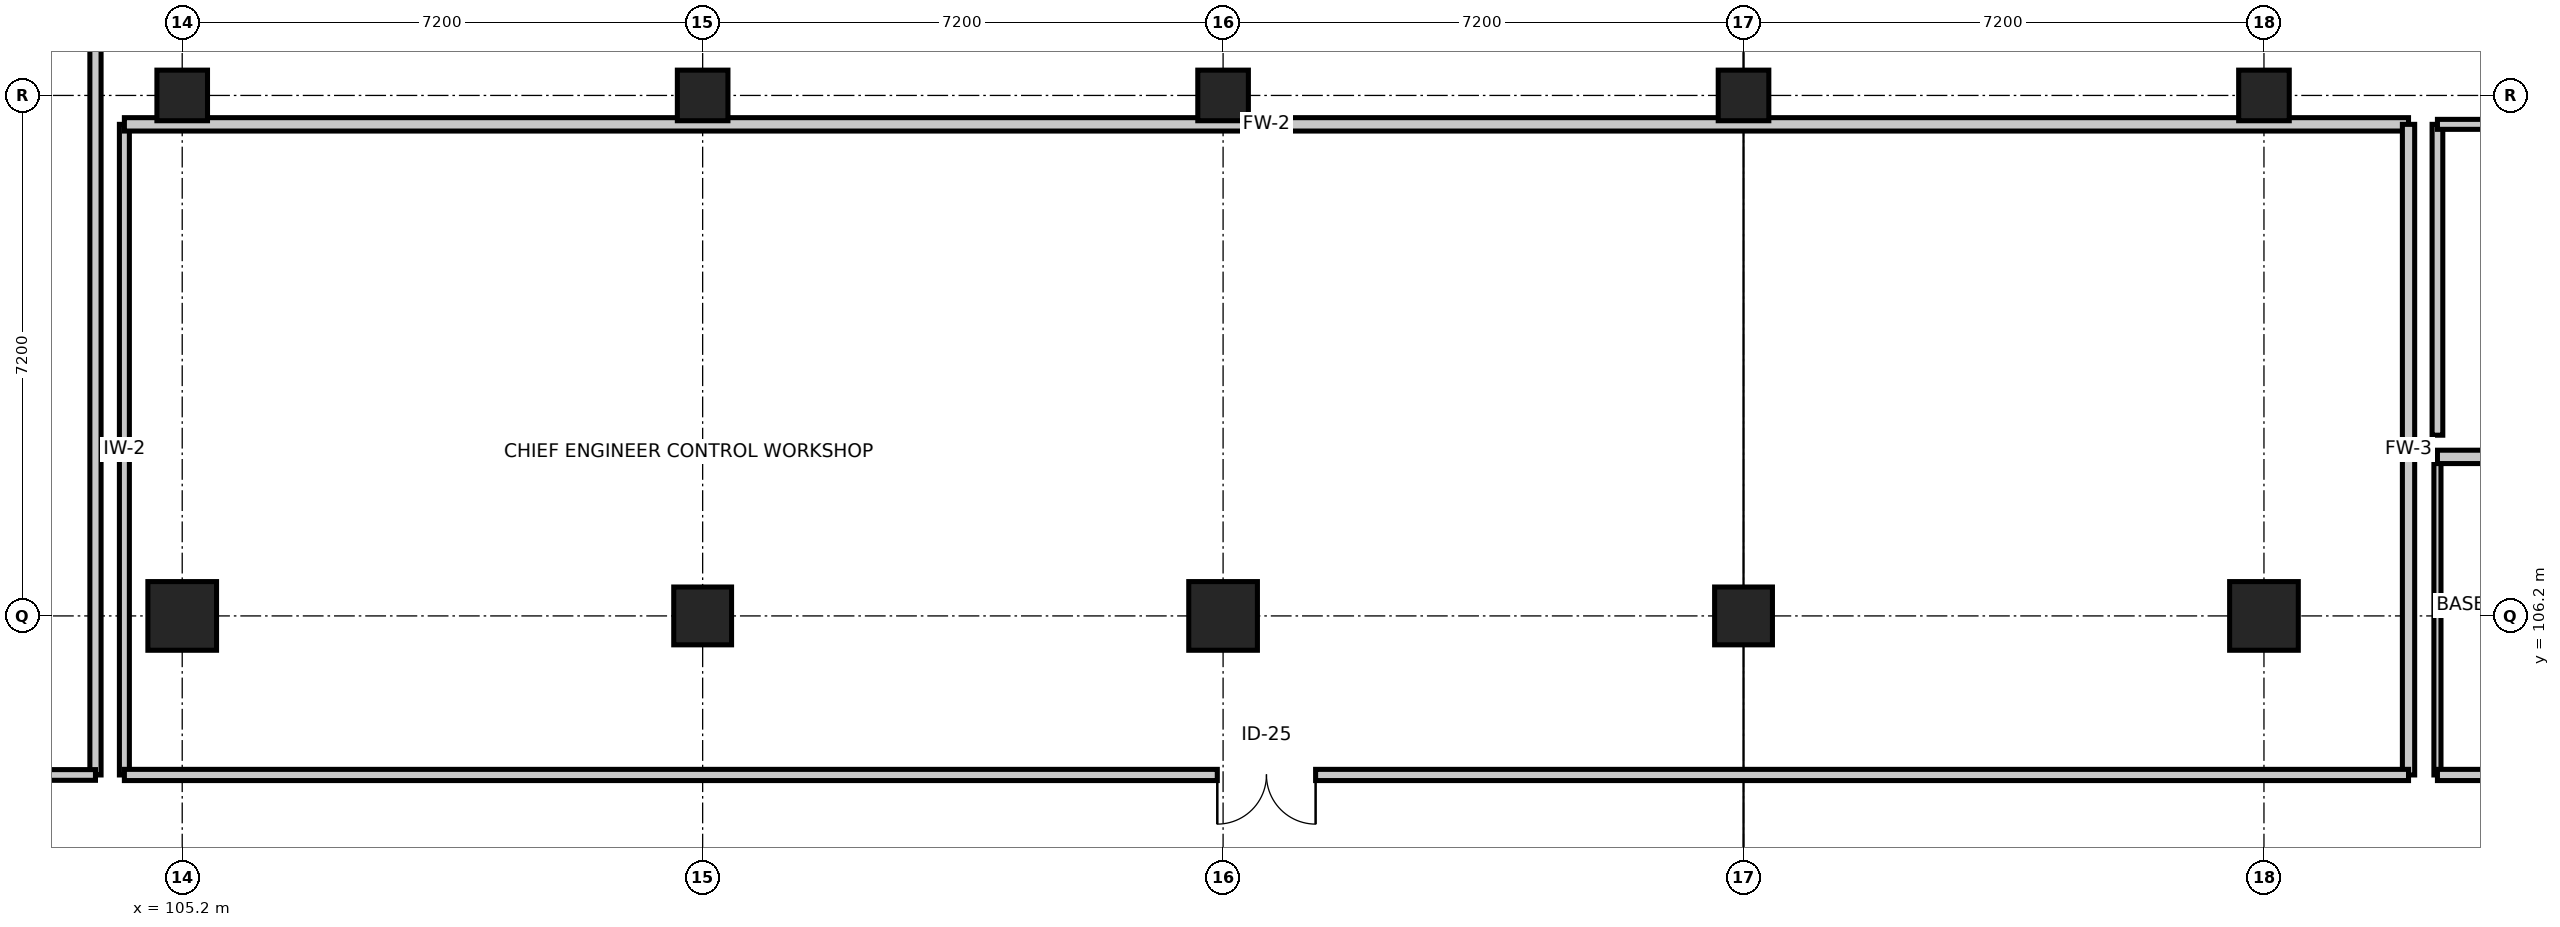
"""IFC4 building model, lengths in metres.
Left out: names, types, materials, properties, quantities, classifications, styles, units other than length and angle.
Written with IfcOpenShell. Run it as: python <this file> out.ifc"""

import sys

from ifc_helpers import new_model, si_unit, direction, frame, frame_2d, origin, origin_2d, place, context, subcontext, project, spatial, rectangle, extrude, element, fill, save


model = new_model("IFC4")
c1 = context("Model", 3, precision=1e-05, world=origin(), true_north=direction((0.0, 1.0)))
c2 = subcontext(c1, "Body", "Model", "MODEL_VIEW")
j1 = project(units=[si_unit("LENGTHUNIT", "METRE"), si_unit("PLANEANGLEUNIT", "RADIAN")], contexts=[c1])
p1 = place(None, origin())
s1 = spatial("IfcSite", under=j1, at=p1, CompositionType="ELEMENT")
p2 = place(p1, origin())
s2 = spatial("IfcBuilding", under=s1, at=p2, CompositionType="ELEMENT")
p3 = place(p2, frame((0.0, 0.0, -4.5)))
s3 = spatial("IfcBuildingStorey", under=s2, at=p3, CompositionType="ELEMENT", Elevation=-4.5)
p4 = place(p3, frame((105.2, 106.2, 0.0), z_axis=(0.0, 0.0, 1.0), x_axis=(1.0, 0.0, 0.0)))
e1 = element("IfcColumn", 1, at=p4, inside=s3, PredefinedType="COLUMN", context=c2, shape_type="SweptSolid", body=[
    extrude(rectangle(XDim=0.95, YDim=0.95, at=origin_2d()), origin(), (0.0, 0.0, 1.0), 4.5),
])
p5 = place(p3, frame((105.2, 113.4, 0.0), z_axis=(0.0, 0.0, 1.0), x_axis=(1.0, 0.0, 0.0)))
e2 = element("IfcColumn", 2, at=p5, inside=s3, PredefinedType="COLUMN", context=c2, shape_type="SweptSolid", body=[
    extrude(rectangle(XDim=0.7, YDim=0.7, at=origin_2d()), origin(), (0.0, 0.0, 1.0), 4.5),
])
p6 = place(p3, frame((112.4, 106.2, 0.0), z_axis=(0.0, 0.0, 1.0), x_axis=(1.0, 0.0, 0.0)))
e3 = element("IfcColumn", 3, at=p6, inside=s3, PredefinedType="COLUMN", context=c2, shape_type="SweptSolid", body=[
    extrude(rectangle(XDim=0.8, YDim=0.8, at=origin_2d()), origin(), (0.0, 0.0, 1.0), 4.5),
])
p7 = place(p3, frame((112.4, 113.4, 0.0), z_axis=(0.0, 0.0, 1.0), x_axis=(1.0, 0.0, 0.0)))
e4 = element("IfcColumn", 4, at=p7, inside=s3, PredefinedType="COLUMN", context=c2, shape_type="SweptSolid", body=[
    extrude(rectangle(XDim=0.7, YDim=0.7, at=origin_2d()), origin(), (0.0, 0.0, 1.0), 4.5),
])
p8 = place(p3, frame((119.6, 106.2, 0.0), z_axis=(0.0, 0.0, 1.0), x_axis=(1.0, 0.0, 0.0)))
e5 = element("IfcColumn", 5, at=p8, inside=s3, PredefinedType="COLUMN", context=c2, shape_type="SweptSolid", body=[
    extrude(rectangle(XDim=0.95, YDim=0.95, at=origin_2d()), origin(), (0.0, 0.0, 1.0), 4.5),
])
p9 = place(p3, frame((119.6, 113.4, 0.0), z_axis=(0.0, 0.0, 1.0), x_axis=(1.0, 0.0, 0.0)))
e6 = element("IfcColumn", 6, at=p9, inside=s3, PredefinedType="COLUMN", context=c2, shape_type="SweptSolid", body=[
    extrude(rectangle(XDim=0.7, YDim=0.7, at=origin_2d()), origin(), (0.0, 0.0, 1.0), 4.5),
])
p10 = place(p3, frame((126.8, 106.2, 0.0), z_axis=(0.0, 0.0, 1.0), x_axis=(1.0, 0.0, 0.0)))
e7 = element("IfcColumn", 7, at=p10, inside=s3, PredefinedType="COLUMN", context=c2, shape_type="SweptSolid", body=[
    extrude(rectangle(XDim=0.8, YDim=0.8, at=origin_2d()), origin(), (0.0, 0.0, 1.0), 4.5),
])
p11 = place(p3, frame((126.8, 113.4, 0.0), z_axis=(0.0, 0.0, 1.0), x_axis=(1.0, 0.0, 0.0)))
e8 = element("IfcColumn", 8, at=p11, inside=s3, PredefinedType="COLUMN", context=c2, shape_type="SweptSolid", body=[
    extrude(rectangle(XDim=0.7, YDim=0.7, at=origin_2d()), origin(), (0.0, 0.0, 1.0), 4.5),
])
p12 = place(p3, frame((134.0, 106.2, 0.0), z_axis=(0.0, 0.0, 1.0), x_axis=(1.0, 0.0, 0.0)))
e9 = element("IfcColumn", 9, at=p12, inside=s3, PredefinedType="COLUMN", context=c2, shape_type="SweptSolid", body=[
    extrude(rectangle(XDim=0.95, YDim=0.95, at=origin_2d()), origin(), (0.0, 0.0, 1.0), 4.5),
])
p13 = place(p3, frame((134.0, 113.4, 0.0), z_axis=(0.0, 0.0, 1.0), x_axis=(1.0, 0.0, 0.0)))
e10 = element("IfcColumn", 10, at=p13, inside=s3, PredefinedType="COLUMN", context=c2, shape_type="SweptSolid", body=[
    extrude(rectangle(XDim=0.7, YDim=0.7, at=origin_2d()), origin(), (0.0, 0.0, 1.0), 4.5),
])
p14 = place(p3, frame((104.0, 117.0, 0.0), z_axis=(0.0, 0.0, 1.0), x_axis=(0.0, -1.0, 0.0)))
e11 = element("IfcWall", 11, at=p14, inside=s3, PredefinedType="PARTITIONING", context=c2, shape_type="SweptSolid", body=[
    extrude(rectangle(XDim=13.0, YDim=0.155, at=frame_2d((6.5, 0.0))), origin(), (0.0, 0.0, 1.0), 3.435),
])
p15 = place(p3, frame((104.0, 104.0, 0.0), z_axis=(0.0, 0.0, 1.0), x_axis=(-1.0, 0.0, 0.0)))
e12 = element("IfcWall", 12, at=p15, inside=s3, PredefinedType="PARTITIONING", context=c2, shape_type="SweptSolid", body=[
    extrude(rectangle(XDim=35.8, YDim=0.148, at=frame_2d((17.9, 0.0))), origin(), (0.0, 0.0, 1.0), 3.335),
])
p16 = place(p15, frame((17.29, 0.0, 0.0)))
e13 = element("IfcOpeningElement", 13, at=p16, cuts=e12, PredefinedType="OPENING", context=c2, shape_type="SweptSolid", body=[
    extrude(rectangle(XDim=1.22, YDim=2.24, at=frame_2d((0.61, 1.12))), frame((0.0, 0.084, 0.0), z_axis=(0.0, -1.0, 0.0), x_axis=(1.0, 0.0, 0.0)), (0.0, 0.0, 1.0), 0.168),
])
p17 = place(p3, frame((104.4, 104.0, 0.0), z_axis=(0.0, 0.0, 1.0), x_axis=(0.0, 1.0, 0.0)))
e14 = element("IfcWall", 14, at=p17, inside=s3, PredefinedType="PARTITIONING", context=c2, shape_type="SweptSolid", body=[
    extrude(rectangle(XDim=9.0, YDim=0.138, at=frame_2d((4.5, 0.0))), origin(), (0.0, 0.0, 1.0), 3.435),
])
p18 = place(p3, frame((104.4, 113.0, 0.0), z_axis=(0.0, 0.0, 1.0), x_axis=(1.0, 0.0, 0.0)))
e15 = element("IfcWall", 15, at=p18, inside=s3, PredefinedType="PARTITIONING", context=c2, shape_type="SweptSolid", body=[
    extrude(rectangle(XDim=31.6, YDim=0.185, at=frame_2d((15.8, 0.0))), origin(), (0.0, 0.0, 1.0), 3.335),
])
p19 = place(p3, frame((136.0, 113.0, 0.0), z_axis=(0.0, 0.0, 1.0), x_axis=(0.0, -1.0, 0.0)))
e16 = element("IfcWall", 16, at=p19, inside=s3, PredefinedType="PARTITIONING", context=c2, shape_type="SweptSolid", body=[
    extrude(rectangle(XDim=9.0, YDim=0.17, at=frame_2d((4.5, 0.0))), origin(), (0.0, 0.0, 1.0), 3.435),
])
p20 = place(p3, frame((136.0, 104.0, 0.0), z_axis=(0.0, 0.0, 1.0), x_axis=(-1.0, 0.0, 0.0)))
e17 = element("IfcWall", 17, at=p20, inside=s3, PredefinedType="PARTITIONING", context=c2, shape_type="SweptSolid", body=[
    extrude(rectangle(XDim=31.6, YDim=0.155, at=frame_2d((15.8, 0.0))), origin(), (0.0, 0.0, 1.0), 3.335),
])
p21 = place(p20, frame((15.12, 0.0, 0.0)))
e18 = element("IfcOpeningElement", 18, at=p21, cuts=e17, PredefinedType="OPENING", context=c2, shape_type="SweptSolid", body=[
    extrude(rectangle(XDim=1.36, YDim=2.22, at=frame_2d((0.68, 1.11))), frame((0.0, 0.087, 0.0), z_axis=(0.0, -1.0, 0.0), x_axis=(1.0, 0.0, 0.0)), (0.0, 0.0, 1.0), 0.175),
])
p22 = place(p3, frame((136.4, 104.0, 0.0), z_axis=(0.0, 0.0, 1.0), x_axis=(0.0, 1.0, 0.0)))
e19 = element("IfcWall", 19, at=p22, inside=s3, PredefinedType="PARTITIONING", context=c2, shape_type="SweptSolid", body=[
    extrude(rectangle(XDim=4.4, YDim=0.098, at=frame_2d((2.2, 0.0))), origin(), (0.0, 0.0, 1.0), 3.435),
])
p23 = place(p3, frame((136.4, 108.4, 0.0), z_axis=(0.0, 0.0, 1.0), x_axis=(1.0, 0.0, 0.0)))
e20 = element("IfcWall", 20, at=p23, inside=s3, PredefinedType="PARTITIONING", context=c2, shape_type="SweptSolid", body=[
    extrude(rectangle(XDim=7.6, YDim=0.185, at=frame_2d((3.8, 0.0))), origin(), (0.0, 0.0, 1.0), 3.335),
])
p24 = place(p3, frame((144.0, 104.0, 0.0), z_axis=(0.0, 0.0, 1.0), x_axis=(-1.0, 0.0, 0.0)))
e21 = element("IfcWall", 21, at=p24, inside=s3, PredefinedType="PARTITIONING", context=c2, shape_type="SweptSolid", body=[
    extrude(rectangle(XDim=7.6, YDim=0.155, at=frame_2d((3.8, 0.0))), origin(), (0.0, 0.0, 1.0), 3.335),
])
p25 = place(p24, frame((3.02, 0.0, 0.0)))
e22 = element("IfcOpeningElement", 22, at=p25, cuts=e21, PredefinedType="OPENING", context=c2, shape_type="SweptSolid", body=[
    extrude(rectangle(XDim=1.56, YDim=2.26, at=frame_2d((0.78, 1.13))), frame((0.0, 0.087, 0.0), z_axis=(0.0, -1.0, 0.0), x_axis=(1.0, 0.0, 0.0)), (0.0, 0.0, 1.0), 0.175),
])
p26 = place(p3, frame((136.4, 108.7, 0.0), z_axis=(0.0, 0.0, 1.0), x_axis=(0.0, 1.0, 0.0)))
e23 = element("IfcWall", 23, at=p26, inside=s3, PredefinedType="PARTITIONING", context=c2, shape_type="SweptSolid", body=[
    extrude(rectangle(XDim=4.3, YDim=0.148, at=frame_2d((2.15, 0.0))), origin(), (0.0, 0.0, 1.0), 3.827),
])
p27 = place(p3, frame((136.4, 113.0, 0.0), z_axis=(0.0, 0.0, 1.0), x_axis=(1.0, 0.0, 0.0)))
e24 = element("IfcWall", 24, at=p27, inside=s3, PredefinedType="PARTITIONING", context=c2, shape_type="SweptSolid", body=[
    extrude(rectangle(XDim=7.6, YDim=0.138, at=frame_2d((3.8, 0.0))), origin(), (0.0, 0.0, 1.0), 3.335),
])
p28 = place(p21, origin())
e25 = element("IfcDoor", 25, at=p28, inside=s3, OperationType="DOUBLE_DOOR_SINGLE_SWING", PredefinedType="DOOR", context=c2, shape_type="SweptSolid", body=[
    extrude(rectangle(XDim=1.36, YDim=2.22, at=frame_2d((0.68, 1.11))), frame((0.0, 0.025, 0.0), z_axis=(0.0, -1.0, 0.0), x_axis=(1.0, 0.0, 0.0)), (0.0, 0.0, 1.0), 0.05),
])
fill(e18, e25)
save(model, sys.argv[1])
